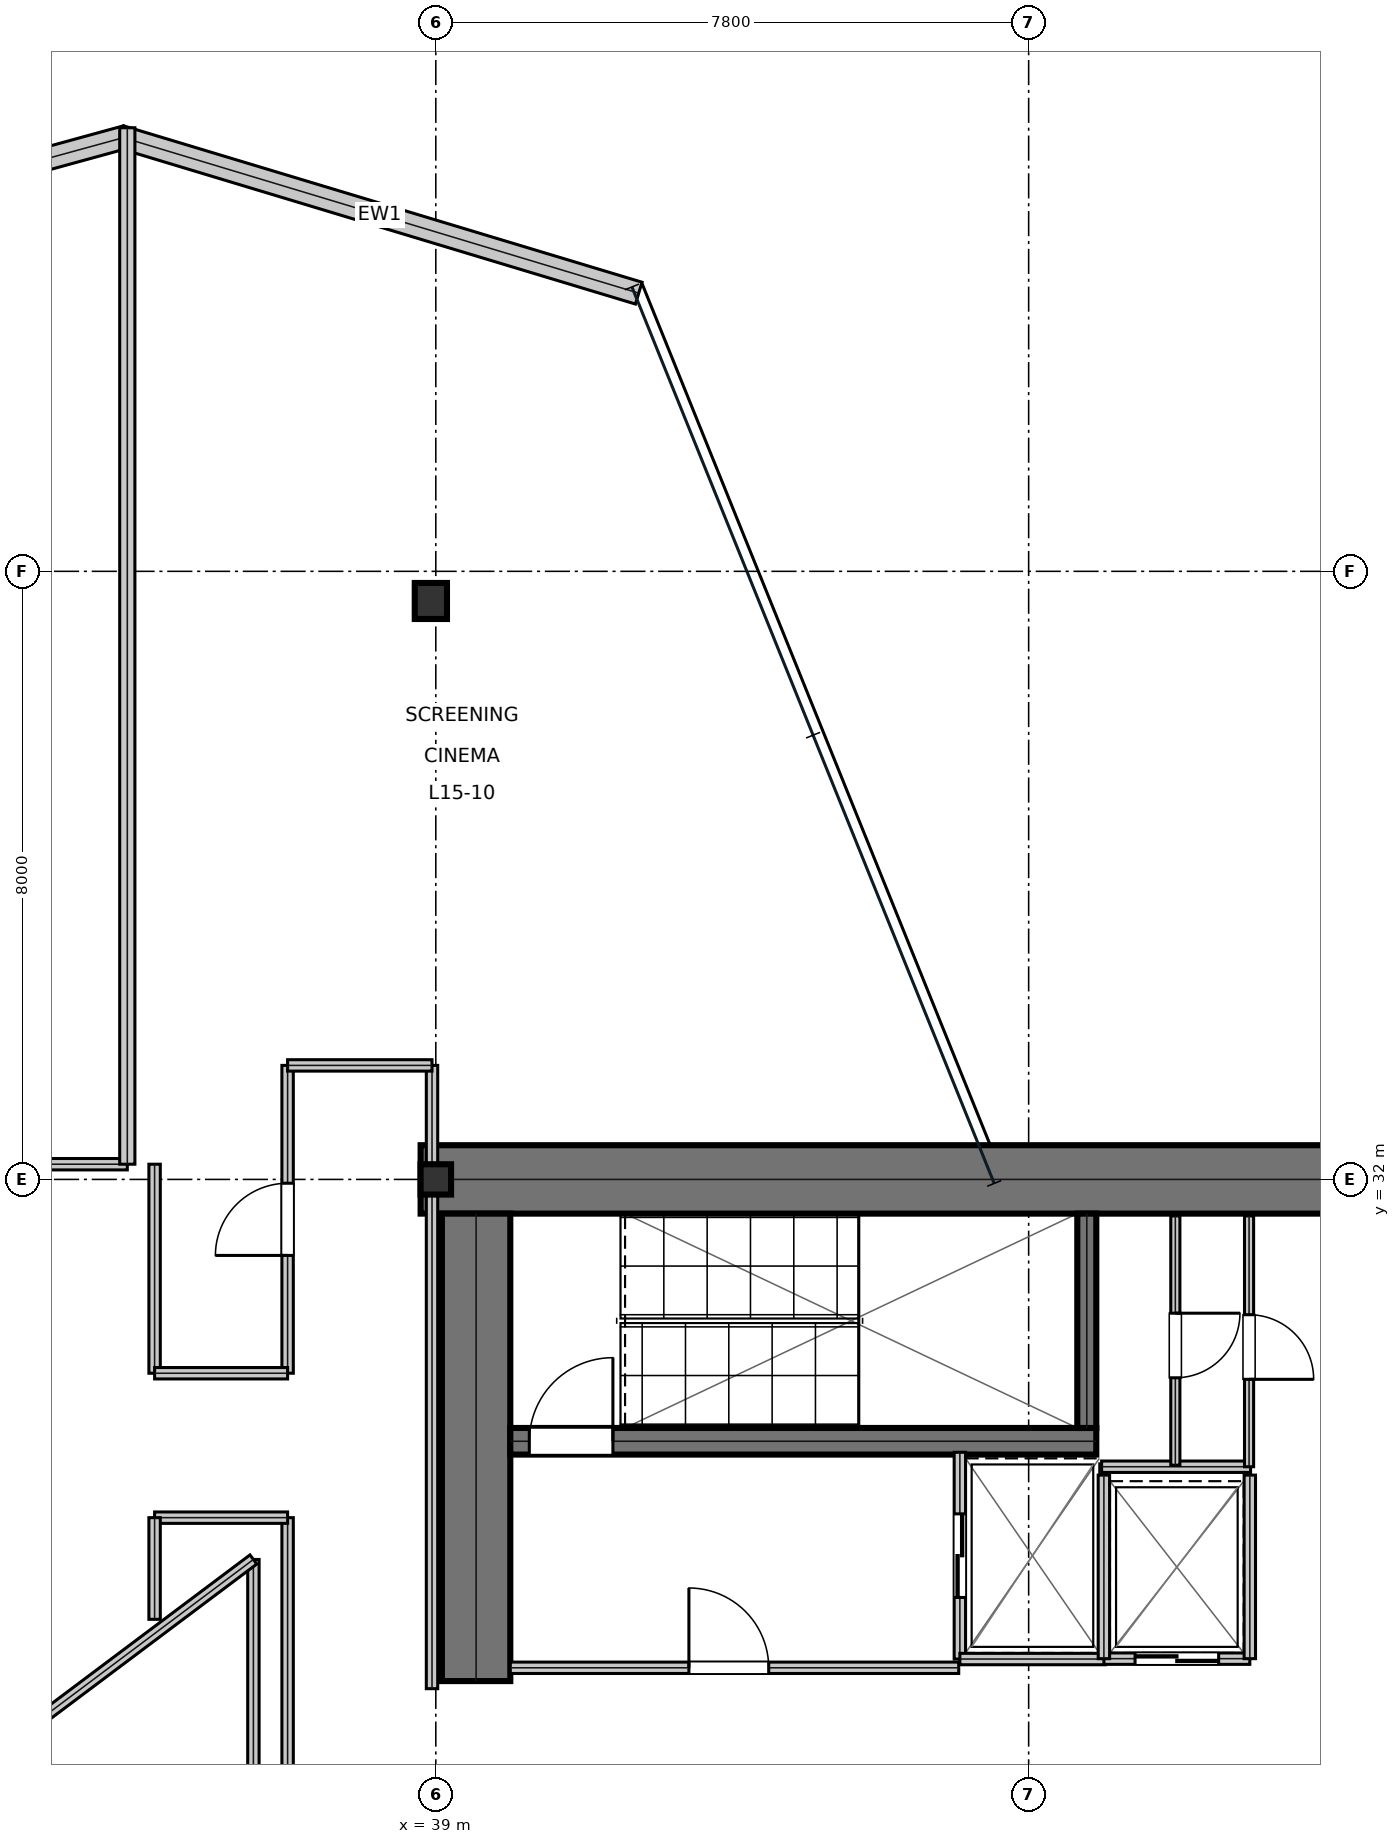
"""IFC4 building model, lengths in metres.
Left out: names, types, materials, properties, quantities, classifications, styles, units other than length and angle.
Written with IfcOpenShell. Run it as: python <this file> out.ifc"""

import sys

from ifc_helpers import new_model, si_unit, direction, frame, frame_2d, origin, origin_2d, place, context, subcontext, project, spatial, rectangle, i_section, extrude, element, fill, save


model = new_model("IFC4")
c1 = context("Model", 3, precision=1e-05, world=origin(), true_north=direction((0.0, 1.0)))
c2 = subcontext(c1, "Body", "Model", "MODEL_VIEW")
j1 = project(units=[si_unit("LENGTHUNIT", "METRE"), si_unit("PLANEANGLEUNIT", "RADIAN")], contexts=[c1])
p1 = place(None, origin())
s1 = spatial("IfcSite", under=j1, at=p1, CompositionType="ELEMENT")
p2 = place(p1, origin())
s2 = spatial("IfcBuilding", under=s1, at=p2, CompositionType="ELEMENT")
p3 = place(p2, frame((0.0, 0.0, 70.2)))
s3 = spatial("IfcBuildingStorey", under=s2, at=p3, CompositionType="ELEMENT", Elevation=70.2)
p4 = place(p3, frame((38.8, 32.0, 0.0), z_axis=(0.0, 0.0, 1.0), x_axis=(1.0, 0.0, 0.0)))
e1 = element("IfcWall", 1, at=p4, inside=s3, PredefinedType="SHEAR", context=c2, shape_type="SweptSolid", body=[
    extrude(rectangle(XDim=16.0, YDim=0.9, at=frame_2d((8.0, 0.0))), origin(), (0.0, 0.0, 1.0), 3.81),
])
p5 = place(p3, frame((39.53, 25.4, 0.0), z_axis=(0.0, 0.0, 1.0), x_axis=(0.0, 1.0, 0.0)))
e2 = element("IfcWall", 2, at=p5, inside=s3, PredefinedType="SHEAR", context=c2, shape_type="SweptSolid", body=[
    extrude(rectangle(XDim=6.15, YDim=0.9, at=frame_2d((3.075, 0.0))), origin(), (0.0, 0.0, 1.0), 3.81),
])
p6 = place(p3, frame((39.98, 28.555, 0.0), z_axis=(0.0, 0.0, 1.0), x_axis=(1.0, 0.0, 0.0)))
e3 = element("IfcWall", 3, at=p6, inside=s3, PredefinedType="SHEAR", context=c2, shape_type="SweptSolid", body=[
    extrude(rectangle(XDim=7.71, YDim=0.35, at=frame_2d((3.855, 0.0))), origin(), (0.0, 0.0, 1.0), 3.81),
])
p7 = place(p6, frame((0.25, 0.0, 0.0)))
e4 = element("IfcOpeningElement", 4, at=p7, cuts=e3, PredefinedType="OPENING", context=c2, shape_type="SweptSolid", body=[
    extrude(rectangle(XDim=1.1, YDim=2.15, at=frame_2d((0.55, 1.075))), frame((0.0, 0.185, 0.0), z_axis=(0.0, -1.0, 0.0), x_axis=(1.0, 0.0, 0.0)), (0.0, 0.0, 1.0), 0.37),
])
p8 = place(p3, frame((47.565, 28.73, 0.0), z_axis=(0.0, 0.0, 1.0), x_axis=(0.0, 1.0, 0.0)))
e5 = element("IfcWall", 5, at=p8, inside=s3, PredefinedType="SHEAR", context=c2, shape_type="SweptSolid", body=[
    extrude(rectangle(XDim=2.82, YDim=0.25, at=frame_2d((1.41, 0.0))), origin(), (0.0, 0.0, 1.0), 3.81),
])
p9 = place(p3, frame((39.0, 32.0, 0.0), z_axis=(0.0, 0.0, 1.0), x_axis=(1.0, 0.0, 0.0)))
e6 = element("IfcColumn", 6, at=p9, inside=s3, PredefinedType="COLUMN", context=c2, shape_type="SweptSolid", body=[
    extrude(i_section(OverallWidth=0.401, OverallDepth=0.399, WebThickness=0.025, FlangeThickness=0.04, at=origin_2d()), origin(), (0.0, 0.0, 1.0), 4.044),
])
p10 = place(p3, frame((38.935, 39.61, 0.016), z_axis=(-0.006254246892, -0.037343318823, 0.999282923368), x_axis=(0.986263587143, -0.165179104839, 0.0)))
e7 = element("IfcColumn", 7, at=p10, inside=s3, PredefinedType="COLUMN", context=c2, shape_type="SweptSolid", body=[
    extrude(i_section(OverallWidth=0.424, OverallDepth=0.474, WebThickness=0.048, FlangeThickness=0.077, at=origin_2d()), origin(), (0.0, 0.0, 1.0), 4.021),
])
p11 = place(p3, frame((41.67, 43.66, 0.0), z_axis=(0.0, 0.0, 1.0), x_axis=(-0.957387451844, 0.288806625707, 0.0)))
e8 = element("IfcWall", 8, at=p11, inside=s3, PredefinedType="STANDARD", context=c2, shape_type="SweptSolid", body=[
    extrude(rectangle(XDim=7.123, YDim=0.3, at=frame_2d((3.562, 0.0))), origin(), (0.0, 0.0, 1.0), 3.81),
])
p12 = place(p3, frame((34.928, 45.716, 0.0), z_axis=(0.0, 0.0, 1.0), x_axis=(-0.96439075506, -0.264481514581, 0.0)))
e9 = element("IfcWall", 9, at=p12, inside=s3, PredefinedType="STANDARD", context=c2, shape_type="SweptSolid", body=[
    extrude(rectangle(XDim=7.071, YDim=0.3, at=frame_2d((3.535, 0.0))), origin(), (0.0, 0.0, 1.0), 3.81),
])
p13 = place(p3, frame((39.98, 25.575, 0.0), z_axis=(0.0, 0.0, 1.0), x_axis=(1.0, 0.0, 0.0)))
e10 = element("IfcWall", 10, at=p13, inside=s3, PredefinedType="PARTITIONING", context=c2, shape_type="SweptSolid", body=[
    extrude(rectangle(XDim=5.9, YDim=0.15, at=frame_2d((2.95, 0.0))), origin(), (0.0, 0.0, 1.0), 3.81),
])
p14 = place(p13, frame((2.35, 0.0, 0.0)))
e11 = element("IfcOpeningElement", 11, at=p14, cuts=e10, PredefinedType="OPENING", context=c2, shape_type="SweptSolid", body=[
    extrude(rectangle(XDim=1.05, YDim=2.15, at=frame_2d((0.525, 1.075))), frame((0.0, 0.085, 0.0), z_axis=(0.0, -1.0, 0.0), x_axis=(1.0, 0.0, 0.0)), (0.0, 0.0, 1.0), 0.17),
])
p15 = place(p3, frame((45.895, 25.69, 0.0), z_axis=(0.0, 0.0, 1.0), x_axis=(0.0, 1.0, 0.0)))
e12 = element("IfcWall", 12, at=p15, inside=s3, PredefinedType="PARTITIONING", context=c2, shape_type="SweptSolid", body=[
    extrude(rectangle(XDim=2.72, YDim=0.15, at=frame_2d((1.36, 0.0))), origin(), (0.0, 0.0, 1.0), 3.81),
])
p16 = place(p15, frame((0.81, 0.0, 0.0)))
e13 = element("IfcOpeningElement", 13, at=p16, cuts=e12, PredefinedType="OPENING", context=c2, shape_type="SweptSolid", body=[
    extrude(rectangle(XDim=1.1, YDim=2.15, at=frame_2d((0.55, 1.075))), frame((0.0, 0.085, 0.0), z_axis=(0.0, -1.0, 0.0), x_axis=(1.0, 0.0, 0.0)), (0.0, 0.0, 1.0), 0.17),
])
p17 = place(p3, frame((45.895, 25.69, 0.0), z_axis=(0.0, 0.0, 1.0), x_axis=(1.0, 0.0, 0.0)))
e14 = element("IfcWall", 14, at=p17, inside=s3, PredefinedType="PARTITIONING", context=c2, shape_type="SweptSolid", body=[
    extrude(rectangle(XDim=1.915, YDim=0.15, at=frame_2d((0.958, 0.0))), origin(), (0.0, 0.0, 1.0), 3.81),
])
p18 = place(p3, frame((47.79, 25.695, 0.0), z_axis=(0.0, 0.0, 1.0), x_axis=(1.0, 0.0, 0.0)))
e15 = element("IfcWall", 15, at=p18, inside=s3, PredefinedType="PARTITIONING", context=c2, shape_type="SweptSolid", body=[
    extrude(rectangle(XDim=1.92, YDim=0.15, at=frame_2d((0.96, 0.0))), origin(), (0.0, 0.0, 1.0), 3.81),
])
p19 = place(p18, frame((0.41, 0.0, 0.0)))
e16 = element("IfcOpeningElement", 16, at=p19, cuts=e15, PredefinedType="OPENING", context=c2, shape_type="SweptSolid", body=[
    extrude(rectangle(XDim=1.1, YDim=2.15, at=frame_2d((0.55, 1.075))), frame((0.0, 0.085, 0.0), z_axis=(0.0, -1.0, 0.0), x_axis=(1.0, 0.0, 0.0)), (0.0, 0.0, 1.0), 0.17),
])
for number, where, z_axis, x_axis in (
    (17, (47.79, 25.695, 0.0), (0.0, 0.0, 1.0), (0.0, 1.0, 0.0)),
    (18, (49.71, 25.695, 0.0), (0.0, 0.0, 1.0), (0.0, 1.0, 0.0)),
):
    element("IfcWall", number, at=place(p3, frame(where, z_axis=z_axis, x_axis=x_axis)), inside=s3, PredefinedType="PARTITIONING", context=c2, shape_type="SweptSolid", body=[
        extrude(rectangle(XDim=2.415, YDim=0.15, at=frame_2d((1.208, 0.0))), origin(), (0.0, 0.0, 1.0), 3.81),
    ])
p20 = place(p3, frame((47.76, 28.22, 0.0), z_axis=(0.0, 0.0, 1.0), x_axis=(1.0, 0.0, 0.0)))
e19 = element("IfcWall", 19, at=p20, inside=s3, PredefinedType="PARTITIONING", context=c2, shape_type="SweptSolid", body=[
    extrude(rectangle(XDim=1.96, YDim=0.15, at=frame_2d((0.98, 0.0))), origin(), (0.0, 0.0, 1.0), 3.81),
])
p21 = place(p3, frame((48.73, 28.24, 0.0), z_axis=(0.0, 0.0, 1.0), x_axis=(0.0, 1.0, 0.0)))
e20 = element("IfcWall", 20, at=p21, inside=s3, PredefinedType="PARTITIONING", context=c2, shape_type="SweptSolid", body=[
    extrude(rectangle(XDim=3.28, YDim=0.12, at=frame_2d((1.64, 0.0))), origin(), (0.0, 0.0, 1.0), 3.81),
])
p22 = place(p21, frame((1.15, 0.0, 0.0)))
e21 = element("IfcOpeningElement", 21, at=p22, cuts=e20, PredefinedType="OPENING", context=c2, shape_type="SweptSolid", body=[
    extrude(rectangle(XDim=0.85, YDim=2.15, at=frame_2d((0.425, 1.075))), frame((0.0, 0.07, 0.0), z_axis=(0.0, -1.0, 0.0), x_axis=(1.0, 0.0, 0.0)), (0.0, 0.0, 1.0), 0.14),
])
p23 = place(p3, frame((49.7, 28.22, 0.0), z_axis=(0.0, 0.0, 1.0), x_axis=(0.0, 1.0, 0.0)))
e22 = element("IfcWall", 22, at=p23, inside=s3, PredefinedType="PARTITIONING", context=c2, shape_type="SweptSolid", body=[
    extrude(rectangle(XDim=3.3, YDim=0.12, at=frame_2d((1.65, 0.0))), origin(), (0.0, 0.0, 1.0), 3.81),
])
p24 = place(p23, frame((1.15, 0.0, 0.0)))
e23 = element("IfcOpeningElement", 23, at=p24, cuts=e22, PredefinedType="OPENING", context=c2, shape_type="SweptSolid", body=[
    extrude(rectangle(XDim=0.85, YDim=2.15, at=frame_2d((0.425, 1.075))), frame((0.0, 0.07, 0.0), z_axis=(0.0, -1.0, 0.0), x_axis=(1.0, 0.0, 0.0)), (0.0, 0.0, 1.0), 0.14),
])
p25 = place(p3, frame((37.05, 14.5, 0.0), z_axis=(0.0, 0.0, 1.0), x_axis=(0.0, 1.0, 0.0)))
e24 = element("IfcWall", 24, at=p25, inside=s3, PredefinedType="PARTITIONING", context=c2, shape_type="SweptSolid", body=[
    extrude(rectangle(XDim=13.05, YDim=0.15, at=frame_2d((6.525, 0.0))), origin(), (0.0, 0.0, 1.0), 3.181),
])
p26 = place(p25, frame((4.61, 0.0, 0.0)))
e25 = element("IfcOpeningElement", 25, at=p26, cuts=e24, PredefinedType="OPENING", context=c2, shape_type="SweptSolid", body=[
    extrude(rectangle(XDim=0.95, YDim=2.15, at=frame_2d((0.475, 1.075))), frame((0.0, 0.085, 0.0), z_axis=(0.0, -1.0, 0.0), x_axis=(1.0, 0.0, 0.0)), (0.0, 0.0, 1.0), 0.17),
])
p27 = place(p3, frame((37.05, 29.45, 0.0), z_axis=(0.0, 0.0, 1.0), x_axis=(0.0, 1.0, 0.0)))
e26 = element("IfcWall", 26, at=p27, inside=s3, PredefinedType="PARTITIONING", context=c2, shape_type="SweptSolid", body=[
    extrude(rectangle(XDim=4.05, YDim=0.15, at=frame_2d((2.025, 0.0))), origin(), (0.0, 0.0, 1.0), 3.181),
])
p28 = place(p27, frame((1.55, 0.0, 0.0)))
e27 = element("IfcOpeningElement", 27, at=p28, cuts=e26, PredefinedType="OPENING", context=c2, shape_type="SweptSolid", body=[
    extrude(rectangle(XDim=0.95, YDim=2.15, at=frame_2d((0.475, 1.075))), frame((0.0, 0.085, 0.0), z_axis=(0.0, -1.0, 0.0), x_axis=(1.0, 0.0, 0.0)), (0.0, 0.0, 1.0), 0.17),
])
p29 = place(p3, frame((35.3, 27.55, 0.0), z_axis=(0.0, 0.0, 1.0), x_axis=(1.0, 0.0, 0.0)))
e28 = element("IfcWall", 28, at=p29, inside=s3, PredefinedType="PARTITIONING", context=c2, shape_type="SweptSolid", body=[
    extrude(rectangle(XDim=1.75, YDim=0.15, at=frame_2d((0.875, 0.0))), origin(), (0.0, 0.0, 1.0), 3.391),
])
p30 = place(p3, frame((35.3, 26.212, 0.0), z_axis=(0.0, 0.0, 1.0), x_axis=(0.0, 1.0, 0.0)))
e29 = element("IfcWall", 29, at=p30, inside=s3, PredefinedType="PARTITIONING", context=c2, shape_type="SweptSolid", body=[
    extrude(rectangle(XDim=1.338, YDim=0.15, at=frame_2d((0.669, 0.0))), origin(), (0.0, 0.0, 1.0), 3.81),
])
p31 = place(p3, frame((33.4, 32.2, 0.0), z_axis=(0.0, 0.0, 1.0), x_axis=(1.0, 0.0, 0.0)))
e30 = element("IfcWall", 30, at=p31, inside=s3, PredefinedType="PARTITIONING", context=c2, shape_type="SweptSolid", body=[
    extrude(rectangle(XDim=1.541, YDim=0.15, at=frame_2d((0.771, 0.0))), origin(), (0.0, 0.0, 1.0), 3.181),
])
p32 = place(p3, frame((38.95, 25.3, 0.0), z_axis=(0.0, 0.0, 1.0), x_axis=(0.0, 1.0, 0.0)))
e31 = element("IfcWall", 31, at=p32, inside=s3, PredefinedType="PARTITIONING", context=c2, shape_type="SweptSolid", body=[
    extrude(rectangle(XDim=8.2, YDim=0.15, at=frame_2d((4.1, 0.0))), origin(), (0.0, 0.0, 1.0), 3.181),
])
p33 = place(p3, frame((35.3, 29.45, 0.0), z_axis=(0.0, 0.0, 1.0), x_axis=(0.0, 1.0, 0.0)))
e32 = element("IfcWall", 32, at=p33, inside=s3, PredefinedType="PARTITIONING", context=c2, shape_type="SweptSolid", body=[
    extrude(rectangle(XDim=2.75, YDim=0.15, at=frame_2d((1.375, 0.0))), origin(), (0.0, 0.0, 1.0), 3.181),
])
p34 = place(p3, frame((37.05, 33.5, 0.0), z_axis=(0.0, 0.0, 1.0), x_axis=(1.0, 0.0, 0.0)))
e33 = element("IfcWall", 33, at=p34, inside=s3, PredefinedType="PARTITIONING", context=c2, shape_type="SweptSolid", body=[
    extrude(rectangle(XDim=1.9, YDim=0.15, at=frame_2d((0.95, 0.0))), origin(), (0.0, 0.0, 1.0), 3.81),
])
p35 = place(p3, frame((35.3, 29.45, 0.0), z_axis=(0.0, 0.0, 1.0), x_axis=(1.0, 0.0, 0.0)))
e34 = element("IfcWall", 34, at=p35, inside=s3, PredefinedType="PARTITIONING", context=c2, shape_type="SweptSolid", body=[
    extrude(rectangle(XDim=1.75, YDim=0.15, at=frame_2d((0.875, 0.0))), origin(), (0.0, 0.0, 1.0), 3.81),
])
p36 = place(p3, frame((34.941, 32.2, 0.0), z_axis=(0.0, 0.0, 1.0), x_axis=(0.0, 1.0, 0.0)))
e35 = element("IfcWall", 35, at=p36, inside=s3, PredefinedType="SOLIDWALL", context=c2, shape_type="SweptSolid", body=[
    extrude(rectangle(XDim=13.636, YDim=0.2, at=frame_2d((6.818, 0.0))), origin(), (0.0, 0.0, 1.0), 3.338),
])
p37 = place(p3, frame((36.6, 21.0, 0.0), z_axis=(0.0, 0.0, 1.0), x_axis=(0.0, 1.0, 0.0)))
e36 = element("IfcWall", 36, at=p37, inside=s3, PredefinedType="MOVABLE", context=c2, shape_type="SweptSolid", body=[
    extrude(rectangle(XDim=6.0, YDim=0.15, at=frame_2d((3.0, 0.0))), origin(), (0.0, 0.0, 1.0), 3.81),
])
p38 = place(p3, frame((36.6, 27.0, 0.0), z_axis=(0.0, 0.0, 1.0), x_axis=(-0.8, -0.6, 0.0)))
e37 = element("IfcWall", 37, at=p38, inside=s3, PredefinedType="MOVABLE", context=c2, shape_type="SweptSolid", body=[
    extrude(rectangle(XDim=5.0, YDim=0.15, at=frame_2d((2.5, 0.0))), origin(), (0.0, 0.0, 1.0), 3.81),
])
p39 = place(p14, origin())
e38 = element("IfcDoor", 38, at=p39, inside=s3, OperationType="SINGLE_SWING_LEFT", PredefinedType="DOOR", context=c2, shape_type="SweptSolid", body=[
    extrude(rectangle(XDim=1.05, YDim=2.15, at=frame_2d((0.525, 1.075))), frame((0.0, 0.025, 0.0), z_axis=(0.0, -1.0, 0.0), x_axis=(1.0, 0.0, 0.0)), (0.0, 0.0, 1.0), 0.05),
])
fill(e11, e38)
p40 = place(p16, frame((1.1, 0.0, 0.0), z_axis=(0.0, 0.0, 1.0), x_axis=(-1.0, 0.0, 0.0)))
e39 = element("IfcDoor", 39, at=p40, inside=s3, OperationType="DOUBLE_DOOR_SLIDING", PredefinedType="DOOR", context=c2, shape_type="SweptSolid", body=[
    extrude(rectangle(XDim=1.1, YDim=2.15, at=frame_2d((0.55, 1.075))), frame((0.0, 0.025, 0.0), z_axis=(0.0, -1.0, 0.0), x_axis=(1.0, 0.0, 0.0)), (0.0, 0.0, 1.0), 0.05),
])
fill(e13, e39)
p41 = place(p19, frame((1.1, 0.0, 0.0), z_axis=(0.0, 0.0, 1.0), x_axis=(-1.0, 0.0, 0.0)))
e40 = element("IfcDoor", 40, at=p41, inside=s3, OperationType="DOUBLE_DOOR_SLIDING", PredefinedType="DOOR", context=c2, shape_type="SweptSolid", body=[
    extrude(rectangle(XDim=1.1, YDim=2.15, at=frame_2d((0.55, 1.075))), frame((0.0, 0.025, 0.0), z_axis=(0.0, -1.0, 0.0), x_axis=(1.0, 0.0, 0.0)), (0.0, 0.0, 1.0), 0.05),
])
fill(e16, e40)
p42 = place(p22, frame((0.85, 0.0, 0.0), z_axis=(0.0, 0.0, 1.0), x_axis=(-1.0, 0.0, 0.0)))
e41 = element("IfcDoor", 41, at=p42, inside=s3, OperationType="SINGLE_SWING_LEFT", PredefinedType="DOOR", context=c2, shape_type="SweptSolid", body=[
    extrude(rectangle(XDim=0.85, YDim=2.15, at=frame_2d((0.425, 1.075))), frame((0.0, 0.025, 0.0), z_axis=(0.0, -1.0, 0.0), x_axis=(1.0, 0.0, 0.0)), (0.0, 0.0, 1.0), 0.05),
])
fill(e21, e41)
p43 = place(p24, frame((0.85, 0.0, 0.0), z_axis=(0.0, 0.0, 1.0), x_axis=(-1.0, 0.0, 0.0)))
e42 = element("IfcDoor", 42, at=p43, inside=s3, OperationType="SINGLE_SWING_RIGHT", PredefinedType="DOOR", context=c2, shape_type="SweptSolid", body=[
    extrude(rectangle(XDim=0.85, YDim=2.15, at=frame_2d((0.425, 1.075))), frame((0.0, 0.025, 0.0), z_axis=(0.0, -1.0, 0.0), x_axis=(1.0, 0.0, 0.0)), (0.0, 0.0, 1.0), 0.05),
])
fill(e23, e42)
p44 = place(p28, origin())
e43 = element("IfcDoor", 43, at=p44, inside=s3, OperationType="SINGLE_SWING_LEFT", PredefinedType="DOOR", context=c2, shape_type="SweptSolid", body=[
    extrude(rectangle(XDim=0.95, YDim=2.15, at=frame_2d((0.475, 1.075))), frame((0.0, 0.025, 0.0), z_axis=(0.0, -1.0, 0.0), x_axis=(1.0, 0.0, 0.0)), (0.0, 0.0, 1.0), 0.05),
])
fill(e27, e43)
p45 = place(p7, origin())
e44 = element("IfcDoor", 44, at=p45, inside=s3, OperationType="SINGLE_SWING_RIGHT", PredefinedType="DOOR", context=c2, shape_type="SweptSolid", body=[
    extrude(rectangle(XDim=1.1, YDim=2.15, at=frame_2d((0.55, 1.075))), frame((0.0, 0.025, 0.0), z_axis=(0.0, -1.0, 0.0), x_axis=(1.0, 0.0, 0.0)), (0.0, 0.0, 1.0), 0.05),
])
fill(e4, e44)
save(model, sys.argv[1])
